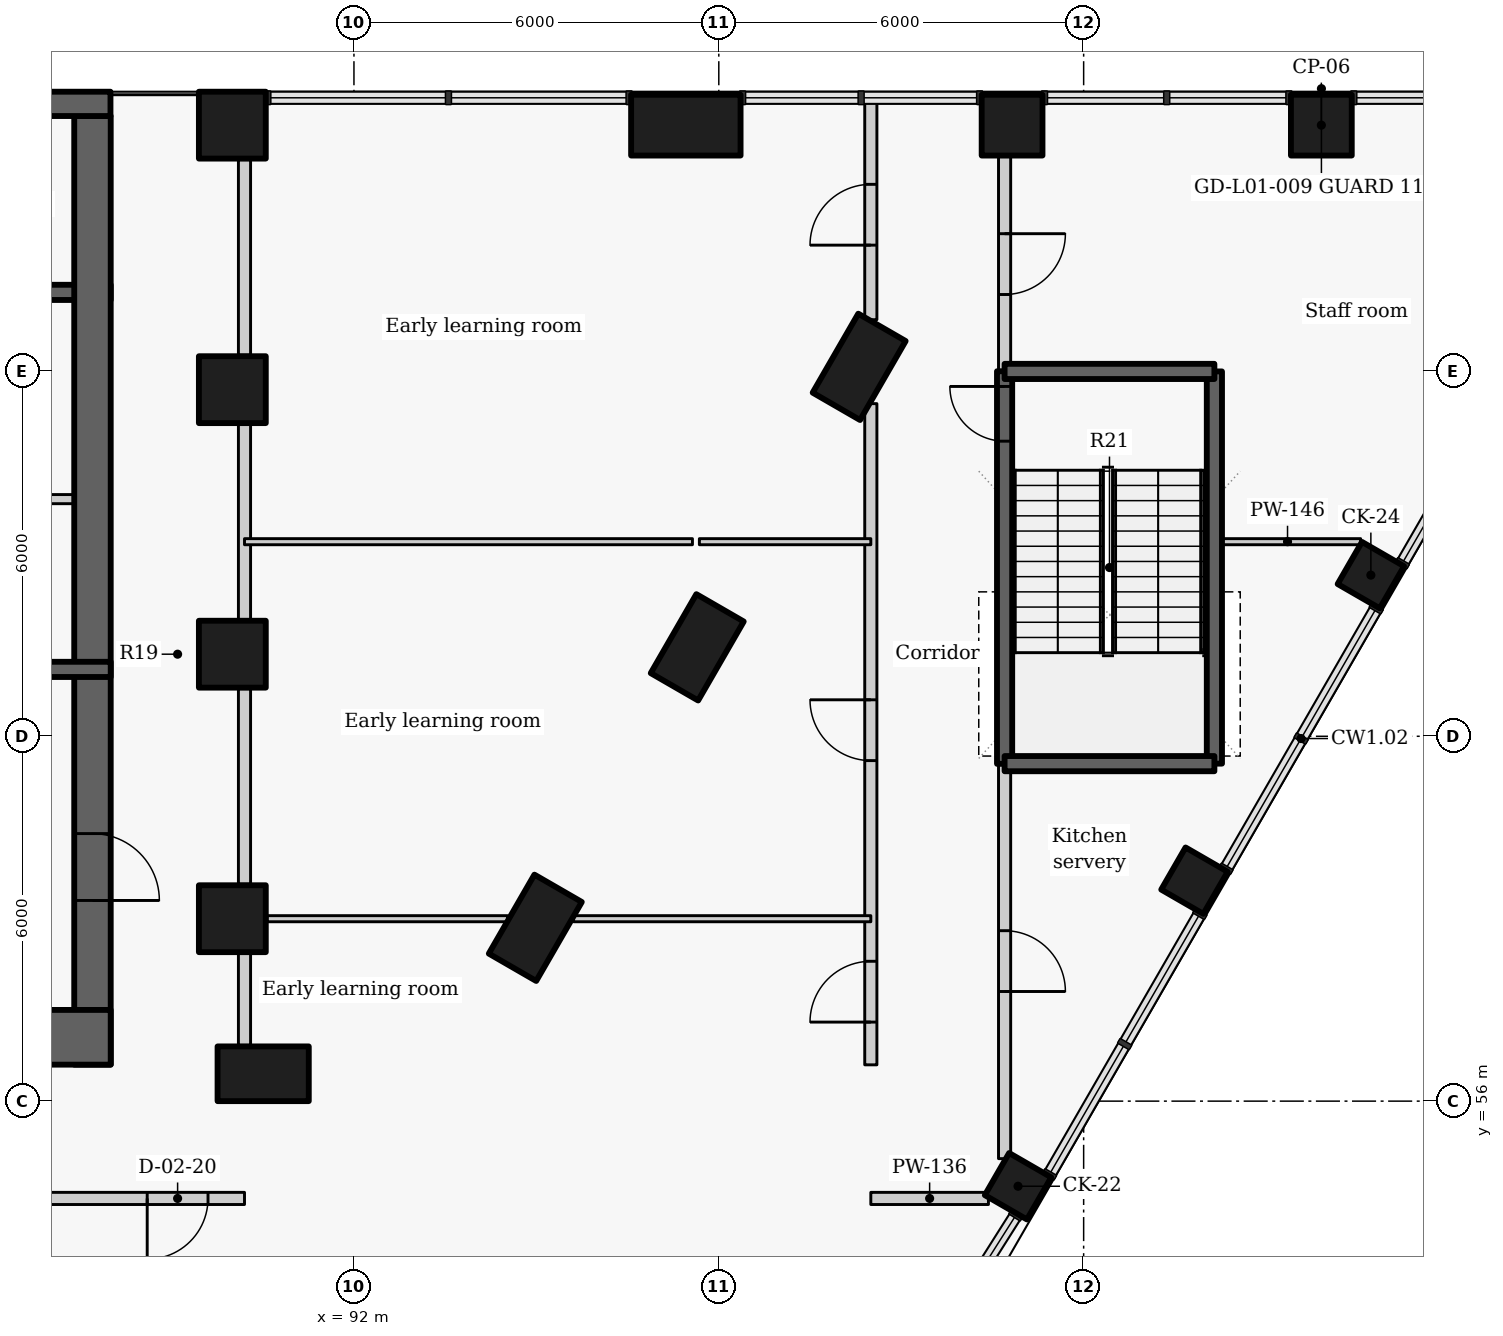
"""IFC4 building model, lengths in metres.
Left out: names, types, materials, properties, quantities, classifications, styles, units other than length and angle.
Written with IfcOpenShell. Run it as: python <this file> out.ifc"""

import sys

from ifc_helpers import new_model, si_unit, direction, frame, frame_2d, origin, origin_2d, place, context, subcontext, project, spatial, rectangle, extrude, element, fill, save


model = new_model("IFC4")
c1 = context("Model", 3, precision=1e-05, world=origin(), true_north=direction((0.0, 1.0)))
c2 = subcontext(c1, "Body", "Model", "MODEL_VIEW")
j1 = project(units=[si_unit("LENGTHUNIT", "METRE"), si_unit("PLANEANGLEUNIT", "RADIAN")], contexts=[c1])
p1 = place(None, origin())
s1 = spatial("IfcSite", under=j1, at=p1, CompositionType="ELEMENT")
p2 = place(p1, origin())
s2 = spatial("IfcBuilding", under=s1, at=p2, CompositionType="ELEMENT")
p3 = place(p2, frame((0.0, 0.0, 6.6)))
s3 = spatial("IfcBuildingStorey", under=s2, at=p3, CompositionType="ELEMENT", Elevation=6.6)
for number, where, z_axis, x_axis in (
    (1, (90.507, 56.45, 0.0), (0.0, 0.0, 1.0), (1.0, 0.0, 0.0)),
    (2, (94.982, 58.851, 0.0), (0.0, 0.0, 1.0), (0.5, 0.866, 0.0)),
    (3, (97.646, 63.463, 0.0), (0.0, 0.0, 1.0), (0.5, 0.866, 0.0)),
    (4, (100.308, 68.075, 0.0), (0.0, 0.0, 1.0), (0.5, 0.866, 0.0)),
):
    element("IfcColumn", number, at=place(p3, frame(where, z_axis=z_axis, x_axis=x_axis)), inside=s3, PredefinedType="COLUMN", context=c2, shape_type="SweptSolid", body=[
        extrude(rectangle(XDim=1.5, YDim=0.9, at=origin_2d()), origin(), (0.0, 0.0, 1.0), 4.8),
    ])
for number, where, z_axis, x_axis in (
    (5, (90.0, 59.0, 0.0), (0.0, 0.0, 1.0), (0.0, 1.0, 0.0)),
    (6, (90.0, 63.35, 0.0), (0.0, 0.0, 1.0), (0.0, 1.0, 0.0)),
    (7, (90.0, 67.7, 0.0), (0.0, 0.0, 1.0), (0.0, 1.0, 0.0)),
    (8, (90.0, 72.05, 0.0), (0.0, 0.0, 1.0), (0.0, 1.0, 0.0)),
):
    element("IfcColumn", number, at=place(p3, frame(where, z_axis=z_axis, x_axis=x_axis)), inside=s3, PredefinedType="COLUMN", context=c2, shape_type="SweptSolid", body=[
        extrude(rectangle(XDim=1.1, YDim=1.1, at=origin_2d()), origin(), (0.0, 0.0, 1.0), 4.8),
    ])
for number, where, z_axis, x_axis in (
    (9, (102.921, 54.6, 0.0), (0.0, 0.0, 1.0), (0.5, 0.866, 0.0)),
    (10, (105.822, 59.625, 0.0), (0.0, 0.0, 1.0), (0.5, 0.866, 0.0)),
    (11, (108.723, 64.65, 0.0), (0.0, 0.0, 1.0), (0.5, 0.866, 0.0)),
):
    element("IfcColumn", number, at=place(p3, frame(where, z_axis=z_axis, x_axis=x_axis)), inside=s3, PredefinedType="COLUMN", context=c2, shape_type="SweptSolid", body=[
        extrude(rectangle(XDim=0.8, YDim=0.8, at=origin_2d()), origin(), (0.0, 0.0, 1.0), 4.8),
    ])
p4 = place(p3, frame((97.458, 72.05, 0.0), z_axis=(0.0, 0.0, 1.0), x_axis=(1.0, 0.0, 0.0)))
e12 = element("IfcColumn", 12, at=p4, inside=s3, PredefinedType="COLUMN", context=c2, shape_type="SweptSolid", body=[
    extrude(rectangle(XDim=1.8, YDim=1.0, at=origin_2d()), origin(), (0.0, 0.0, 1.0), 4.8),
])
for number, where, z_axis, x_axis in (
    (13, (102.823, 72.05, 0.0), (0.0, 0.0, 1.0), (1.0, 0.0, 0.0)),
    (14, (107.909, 72.05, 0.0), (0.0, 0.0, 1.0), (1.0, 0.0, 0.0)),
):
    element("IfcColumn", number, at=place(p3, frame(where, z_axis=z_axis, x_axis=x_axis)), inside=s3, PredefinedType="COLUMN", context=c2, shape_type="SweptSolid", body=[
        extrude(rectangle(XDim=1.0, YDim=1.0, at=origin_2d()), origin(), (0.0, 0.0, 1.0), 4.8),
    ])
p5 = place(p3, frame((85.4, 69.3, -0.3), z_axis=(0.0, 0.0, 1.0), x_axis=(1.0, 0.0, 0.0)))
e15 = element("IfcWall", 15, at=p5, inside=s3, PredefinedType="SHEAR", context=c2, shape_type="SweptSolid", body=[
    extrude(rectangle(XDim=2.6, YDim=0.25, at=frame_2d((1.3, 0.0))), origin(), (0.0, 0.0, 1.0), 4.8),
])
p6 = place(p5, frame((0.525, 0.0, 0.3)))
e16 = element("IfcOpeningElement", 16, at=p6, cuts=e15, PredefinedType="OPENING", context=c2, shape_type="SweptSolid", body=[
    extrude(rectangle(XDim=0.9, YDim=2.1, at=frame_2d((0.45, 1.05))), frame((0.0, 0.135, 0.0), z_axis=(0.0, -1.0, 0.0), x_axis=(1.0, 0.0, 0.0)), (0.0, 0.0, 1.0), 0.27),
])
p7 = place(p3, frame((87.7, 72.2, -0.3), z_axis=(0.0, 0.0, 1.0), x_axis=(0.0, -1.0, 0.0)))
e17 = element("IfcWall", 17, at=p7, inside=s3, PredefinedType="SHEAR", context=c2, shape_type="SweptSolid", body=[
    extrude(rectangle(XDim=15.6, YDim=0.6, at=frame_2d((7.8, 0.0))), origin(), (0.0, 0.0, 1.0), 4.8),
])
p8 = place(p7, frame((11.8, 0.0, 0.3)))
e18 = element("IfcOpeningElement", 18, at=p8, cuts=e17, PredefinedType="OPENING", context=c2, shape_type="SweptSolid", body=[
    extrude(rectangle(XDim=1.1, YDim=2.1, at=frame_2d((0.55, 1.05))), frame((0.0, 0.31, 0.0), z_axis=(0.0, -1.0, 0.0), x_axis=(1.0, 0.0, 0.0)), (0.0, 0.0, 1.0), 0.62),
])
p9 = place(p3, frame((88.0, 65.9, 0.0), z_axis=(0.0, 0.0, 1.0), x_axis=(-1.0, 0.0, 0.0)))
e19 = element("IfcWall", 19, at=p9, inside=s3, PredefinedType="PARTITIONING", context=c2, shape_type="SweptSolid", body=[
    extrude(rectangle(XDim=2.603, YDim=0.15, at=frame_2d((1.302, 0.0))), origin(), (0.0, 0.0, 1.0), 4.5),
])
p10 = place(p9, frame((1.175, 0.0, 0.0)))
e20 = element("IfcOpeningElement", 20, at=p10, cuts=e19, PredefinedType="OPENING", context=c2, shape_type="SweptSolid", body=[
    extrude(rectangle(XDim=0.9, YDim=2.1, at=frame_2d((0.45, 1.05))), frame((0.0, 0.085, 0.0), z_axis=(0.0, -1.0, 0.0), x_axis=(1.0, 0.0, 0.0)), (0.0, 0.0, 1.0), 0.17),
])
p11 = place(p3, frame((80.0, 63.1, -0.3), z_axis=(0.0, 0.0, 1.0), x_axis=(1.0, 0.0, 0.0)))
e21 = element("IfcWall", 21, at=p11, inside=s3, PredefinedType="SHEAR", context=c2, shape_type="SweptSolid", body=[
    extrude(rectangle(XDim=8.0, YDim=0.25, at=frame_2d((4.0, 0.0))), origin(), (0.0, 0.0, 1.0), 4.8),
])
p12 = place(p11, frame((3.849, 0.0, 0.3)))
e22 = element("IfcOpeningElement", 22, at=p12, cuts=e21, PredefinedType="OPENING", context=c2, shape_type="SweptSolid", body=[
    extrude(rectangle(XDim=1.1, YDim=2.1, at=frame_2d((0.55, 1.05))), frame((0.0, 0.135, 0.0), z_axis=(0.0, -1.0, 0.0), x_axis=(1.0, 0.0, 0.0)), (0.0, 0.0, 1.0), 0.27),
])
p13 = place(p3, frame((88.0, 57.05, -0.3), z_axis=(0.0, 0.0, 1.0), x_axis=(-1.0, 0.0, 0.0)))
e23 = element("IfcWall", 23, at=p13, inside=s3, PredefinedType="SHEAR", context=c2, shape_type="SweptSolid", body=[
    extrude(rectangle(XDim=4.6, YDim=0.9, at=frame_2d((2.3, 0.0))), origin(), (0.0, 0.0, 1.0), 4.8),
])
p14 = place(p13, frame((1.752, 0.0, 0.3)))
e24 = element("IfcOpeningElement", 24, at=p14, cuts=e23, PredefinedType="OPENING", context=c2, shape_type="SweptSolid", body=[
    extrude(rectangle(XDim=1.1, YDim=2.1, at=frame_2d((0.55, 1.05))), frame((0.0, 0.46, 0.0), z_axis=(0.0, -1.0, 0.0), x_axis=(1.0, 0.0, 0.0)), (0.0, 0.0, 1.0), 0.92),
])
p15 = place(p3, frame((102.7, 61.547, -0.3), z_axis=(0.0, 0.0, 1.0), x_axis=(0.0, 1.0, 0.0)))
e25 = element("IfcWall", 25, at=p15, inside=s3, PredefinedType="SHEAR", context=c2, shape_type="SweptSolid", body=[
    extrude(rectangle(XDim=6.456, YDim=0.25, at=frame_2d((3.228, 0.0))), origin(), (0.0, 0.0, 1.0), 4.8),
])
p16 = place(p15, frame((5.306, 0.0, 0.3)))
e26 = element("IfcOpeningElement", 26, at=p16, cuts=e25, PredefinedType="OPENING", context=c2, shape_type="SweptSolid", body=[
    extrude(rectangle(XDim=0.9, YDim=2.1, at=frame_2d((0.45, 1.05))), frame((0.0, 0.135, 0.0), z_axis=(0.0, -1.0, 0.0), x_axis=(1.0, 0.0, 0.0)), (0.0, 0.0, 1.0), 0.27),
])
p17 = place(p3, frame((102.7, 61.553, 0.0), z_axis=(0.0, 0.0, 1.0), x_axis=(0.0, -1.0, 0.0)))
e27 = element("IfcWall", 27, at=p17, inside=s3, PredefinedType="PARTITIONING", context=c2, shape_type="SweptSolid", body=[
    extrude(rectangle(XDim=6.499, YDim=0.2, at=frame_2d((3.249, 0.0))), origin(), (0.0, 0.0, 1.0), 4.5),
])
p18 = place(p17, frame((2.75, 0.0, 0.0)))
e28 = element("IfcOpeningElement", 28, at=p18, cuts=e27, PredefinedType="OPENING", context=c2, shape_type="SweptSolid", body=[
    extrude(rectangle(XDim=1.0, YDim=2.1, at=frame_2d((0.5, 1.05))), frame((0.0, 0.11, 0.0), z_axis=(0.0, -1.0, 0.0), x_axis=(1.0, 0.0, 0.0)), (0.0, 0.0, 1.0), 0.22),
])
p19 = place(p3, frame((102.7, 71.533, 0.0), z_axis=(0.0, 0.0, 1.0), x_axis=(0.0, -1.0, 0.0)))
e29 = element("IfcWall", 29, at=p19, inside=s3, PredefinedType="PARTITIONING", context=c2, shape_type="SweptSolid", body=[
    extrude(rectangle(XDim=3.536, YDim=0.2, at=frame_2d((1.768, 0.0))), origin(), (0.0, 0.0, 1.0), 4.5),
])
p20 = place(p19, frame((1.268, 0.0, 0.0)))
e30 = element("IfcOpeningElement", 30, at=p20, cuts=e29, PredefinedType="OPENING", context=c2, shape_type="SweptSolid", body=[
    extrude(rectangle(XDim=1.0, YDim=2.1, at=frame_2d((0.5, 1.05))), frame((0.0, 0.11, 0.0), z_axis=(0.0, -1.0, 0.0), x_axis=(1.0, 0.0, 0.0)), (0.0, 0.0, 1.0), 0.22),
])
p21 = place(p3, frame((100.5, 56.597, 0.0), z_axis=(0.0, 0.0, 1.0), x_axis=(0.0, 1.0, 0.0)))
e31 = element("IfcWall", 31, at=p21, inside=s3, PredefinedType="PARTITIONING", context=c2, shape_type="SweptSolid", body=[
    extrude(rectangle(XDim=10.873, YDim=0.2, at=frame_2d((5.437, 0.0))), origin(), (0.0, 0.0, 1.0), 4.5),
])
p22 = place(p21, frame((5.003, 0.0, 0.0)))
e32 = element("IfcOpeningElement", 32, at=p22, cuts=e31, PredefinedType="OPENING", context=c2, shape_type="SweptSolid", body=[
    extrude(rectangle(XDim=1.0, YDim=2.1, at=frame_2d((0.5, 1.05))), frame((0.0, 0.11, 0.0), z_axis=(0.0, -1.0, 0.0), x_axis=(1.0, 0.0, 0.0)), (0.0, 0.0, 1.0), 0.22),
])
p23 = place(p21, frame((0.703, 0.0, 0.0)))
e33 = element("IfcOpeningElement", 33, at=p23, cuts=e31, PredefinedType="OPENING", context=c2, shape_type="SweptSolid", body=[
    extrude(rectangle(XDim=1.0, YDim=2.1, at=frame_2d((0.5, 1.05))), frame((0.0, 0.11, 0.0), z_axis=(0.0, -1.0, 0.0), x_axis=(1.0, 0.0, 0.0)), (0.0, 0.0, 1.0), 0.22),
])
p24 = place(p3, frame((100.5, 68.851, 0.0), z_axis=(0.0, 0.0, 1.0), x_axis=(0.0, 1.0, 0.0)))
e34 = element("IfcWall", 34, at=p24, inside=s3, PredefinedType="PARTITIONING", context=c2, shape_type="SweptSolid", body=[
    extrude(rectangle(XDim=3.569, YDim=0.2, at=frame_2d((1.785, 0.0))), origin(), (0.0, 0.0, 1.0), 3.73),
])
p25 = place(p24, frame((1.226, 0.0, 0.0)))
e35 = element("IfcOpeningElement", 35, at=p25, cuts=e34, PredefinedType="OPENING", context=c2, shape_type="SweptSolid", body=[
    extrude(rectangle(XDim=1.0, YDim=2.1, at=frame_2d((0.5, 1.05))), frame((0.0, 0.11, 0.0), z_axis=(0.0, -1.0, 0.0), x_axis=(1.0, 0.0, 0.0)), (0.0, 0.0, 1.0), 0.22),
])
p26 = place(p3, frame((90.2, 56.917, 0.0), z_axis=(0.0, 0.0, 1.0), x_axis=(0.0, 1.0, 0.0)))
e36 = element("IfcWall", 36, at=p26, inside=s3, PredefinedType="PARTITIONING", context=c2, shape_type="SweptSolid", body=[
    extrude(rectangle(XDim=1.516, YDim=0.2, at=frame_2d((0.758, 0.0))), origin(), (0.0, 0.0, 1.0), 4.5),
])
for number, where, z_axis, x_axis in (
    (37, (90.2, 59.567, 0.0), (0.0, 0.0, 1.0), (0.0, 1.0, 0.0)),
    (38, (90.2, 63.917, 0.0), (0.0, 0.0, 1.0), (0.0, 1.0, 0.0)),
):
    element("IfcWall", number, at=place(p3, frame(where, z_axis=z_axis, x_axis=x_axis)), inside=s3, PredefinedType="PARTITIONING", context=c2, shape_type="SweptSolid", body=[
        extrude(rectangle(XDim=3.216, YDim=0.2, at=frame_2d((1.608, 0.0))), origin(), (0.0, 0.0, 1.0), 3.73),
    ])
p27 = place(p3, frame((90.2, 68.267, 0.0), z_axis=(0.0, 0.0, 1.0), x_axis=(0.0, 1.0, 0.0)))
e39 = element("IfcWall", 39, at=p27, inside=s3, PredefinedType="PARTITIONING", context=c2, shape_type="SweptSolid", body=[
    extrude(rectangle(XDim=3.216, YDim=0.2, at=frame_2d((1.608, 0.0))), origin(), (0.0, 0.0, 1.0), 3.73),
])
p28 = place(p3, frame((106.15, 61.55, -0.3), z_axis=(0.0, 0.0, 1.0), x_axis=(0.0, 1.0, 0.0)))
e40 = element("IfcWall", 40, at=p28, inside=s3, PredefinedType="SHEAR", context=c2, shape_type="SweptSolid", body=[
    extrude(rectangle(XDim=6.45, YDim=0.25, at=frame_2d((3.225, 0.0))), origin(), (0.0, 0.0, 1.0), 4.8),
])
p29 = place(p3, frame((90.2, 54.4, 0.0), z_axis=(0.0, 0.0, 1.0), x_axis=(-1.0, 0.0, 0.0)))
e41 = element("IfcWall", 41, at=p29, inside=s3, PredefinedType="PARTITIONING", context=c2, shape_type="SweptSolid", body=[
    extrude(rectangle(XDim=20.4, YDim=0.2, at=frame_2d((10.2, 0.0))), origin(), (0.0, 0.0, 1.0), 4.5),
])
p30 = place(p29, frame((18.8, 0.0, 0.0)))
e42 = element("IfcOpeningElement", 42, at=p30, cuts=e41, PredefinedType="OPENING", context=c2, shape_type="SweptSolid", body=[
    extrude(rectangle(XDim=1.0, YDim=2.1, at=frame_2d((0.5, 1.05))), frame((0.0, 0.11, 0.0), z_axis=(0.0, -1.0, 0.0), x_axis=(1.0, 0.0, 0.0)), (0.0, 0.0, 1.0), 0.22),
])
p31 = place(p29, frame((0.6, 0.0, 0.0)))
e43 = element("IfcOpeningElement", 43, at=p31, cuts=e41, PredefinedType="OPENING", context=c2, shape_type="SweptSolid", body=[
    extrude(rectangle(XDim=1.0, YDim=2.1, at=frame_2d((0.5, 1.05))), frame((0.0, 0.11, 0.0), z_axis=(0.0, -1.0, 0.0), x_axis=(1.0, 0.0, 0.0)), (0.0, 0.0, 1.0), 0.22),
])
p32 = place(p29, frame((10.1, 0.0, 0.0)))
e44 = element("IfcOpeningElement", 44, at=p32, cuts=e41, PredefinedType="OPENING", context=c2, shape_type="SweptSolid", body=[
    extrude(rectangle(XDim=1.0, YDim=2.1, at=frame_2d((0.5, 1.05))), frame((0.0, 0.11, 0.0), z_axis=(0.0, -1.0, 0.0), x_axis=(1.0, 0.0, 0.0)), (0.0, 0.0, 1.0), 0.22),
])
p33 = place(p3, frame((100.5, 54.4, 0.0), z_axis=(0.0, 0.0, 1.0), x_axis=(1.0, 0.0, 0.0)))
e45 = element("IfcWall", 45, at=p33, inside=s3, PredefinedType="PARTITIONING", context=c2, shape_type="SweptSolid", body=[
    extrude(rectangle(XDim=1.934, YDim=0.2, at=frame_2d((0.967, 0.0))), origin(), (0.0, 0.0, 1.0), 4.5),
])
for number, where, z_axis, x_axis in (
    (46, (102.7, 68.0, -0.3), (0.0, 0.0, 1.0), (1.0, 0.0, 0.0)),
    (47, (102.7, 61.55, -0.3), (0.0, 0.0, 1.0), (1.0, 0.0, 0.0)),
):
    element("IfcWall", number, at=place(p3, frame(where, z_axis=z_axis, x_axis=x_axis)), inside=s3, PredefinedType="SHEAR", context=c2, shape_type="SweptSolid", body=[
        extrude(rectangle(XDim=3.45, YDim=0.25, at=frame_2d((1.725, 0.0))), origin(), (0.0, 0.0, 1.0), 4.8),
    ])
p34 = place(p3, frame((90.2, 65.2, 0.0), z_axis=(0.0, 0.0, 1.0), x_axis=(1.0, 0.0, 0.0)))
e48 = element("IfcWall", 48, at=p34, inside=s3, PredefinedType="PARTITIONING", context=c2, shape_type="SweptSolid", body=[
    extrude(rectangle(XDim=7.366, YDim=0.1, at=frame_2d((3.683, 0.0))), origin(), (0.0, 0.0, 1.0), 4.5),
])
p35 = place(p3, frame((97.68, 65.2, 0.0), z_axis=(0.0, 0.0, 1.0), x_axis=(1.0, 0.0, 0.0)))
e49 = element("IfcWall", 49, at=p35, inside=s3, PredefinedType="PARTITIONING", context=c2, shape_type="SweptSolid", body=[
    extrude(rectangle(XDim=2.82, YDim=0.1, at=frame_2d((1.41, 0.0))), origin(), (0.0, 0.0, 1.0), 3.58),
])
p36 = place(p3, frame((106.15, 65.2, 0.0), z_axis=(0.0, 0.0, 1.0), x_axis=(1.0, 0.0, 0.0)))
e50 = element("IfcWall", 50, at=p36, inside=s3, PredefinedType="PARTITIONING", context=c2, shape_type="SweptSolid", body=[
    extrude(rectangle(XDim=2.406, YDim=0.1, at=frame_2d((1.203, 0.0))), origin(), (0.0, 0.0, 1.0), 4.5),
])
p37 = place(p3, frame((90.57, 59.0, 0.0), z_axis=(0.0, 0.0, 1.0), x_axis=(1.0, 0.0, 0.0)))
e51 = element("IfcWall", 51, at=p37, inside=s3, PredefinedType="PARTITIONING", context=c2, shape_type="SweptSolid", body=[
    extrude(rectangle(XDim=3.956, YDim=0.1, at=frame_2d((1.978, 0.0))), origin(), (0.0, 0.0, 1.0), 4.5),
])
p38 = place(p3, frame((95.612, 59.0, 0.0), z_axis=(0.0, 0.0, 1.0), x_axis=(1.0, 0.0, 0.0)))
e52 = element("IfcWall", 52, at=p38, inside=s3, PredefinedType="PARTITIONING", context=c2, shape_type="SweptSolid", body=[
    extrude(rectangle(XDim=4.888, YDim=0.1, at=frame_2d((2.444, 0.0))), origin(), (0.0, 0.0, 1.0), 4.5),
])
p39 = place(p3, frame((72.004, 72.4, -0.3), z_axis=(0.0, 0.0, 1.0), x_axis=(1.0, 0.0, 0.0)))
e53 = element("IfcWall", 53, at=p39, inside=s3, PredefinedType="SHEAR", context=c2, shape_type="SweptSolid", body=[
    extrude(rectangle(XDim=15.992, YDim=0.4, at=frame_2d((7.996, 0.0))), origin(), (0.0, 0.0, 1.0), 4.8),
])
p40 = place(p16, origin())
e54 = element("IfcDoor", 54, at=p40, inside=s3, OperationType="SINGLE_SWING_RIGHT", PredefinedType="DOOR", context=c2, shape_type="SweptSolid", body=[
    extrude(rectangle(XDim=0.9, YDim=2.1, at=frame_2d((0.45, 1.05))), frame((0.0, 0.025, 0.0), z_axis=(0.0, -1.0, 0.0), x_axis=(1.0, 0.0, 0.0)), (0.0, 0.0, 1.0), 0.05),
])
fill(e26, e54)
p41 = place(p20, origin())
e55 = element("IfcDoor", 55, at=p41, inside=s3, OperationType="SINGLE_SWING_LEFT", PredefinedType="DOOR", context=c2, shape_type="SweptSolid", body=[
    extrude(rectangle(XDim=1.0, YDim=2.1, at=frame_2d((0.5, 1.05))), frame((0.0, 0.025, 0.0), z_axis=(0.0, -1.0, 0.0), x_axis=(1.0, 0.0, 0.0)), (0.0, 0.0, 1.0), 0.05),
])
fill(e30, e55)
p42 = place(p18, origin())
e56 = element("IfcDoor", 56, at=p42, inside=s3, OperationType="SINGLE_SWING_RIGHT", PredefinedType="DOOR", context=c2, shape_type="SweptSolid", body=[
    extrude(rectangle(XDim=1.0, YDim=2.1, at=frame_2d((0.5, 1.05))), frame((0.0, 0.025, 0.0), z_axis=(0.0, -1.0, 0.0), x_axis=(1.0, 0.0, 0.0)), (0.0, 0.0, 1.0), 0.05),
])
fill(e28, e56)
p43 = place(p25, origin())
e57 = element("IfcDoor", 57, at=p43, inside=s3, OperationType="SINGLE_SWING_LEFT", PredefinedType="DOOR", context=c2, shape_type="SweptSolid", body=[
    extrude(rectangle(XDim=1.0, YDim=2.1, at=frame_2d((0.5, 1.05))), frame((0.0, 0.025, 0.0), z_axis=(0.0, -1.0, 0.0), x_axis=(1.0, 0.0, 0.0)), (0.0, 0.0, 1.0), 0.05),
])
fill(e35, e57)
p44 = place(p22, origin())
e58 = element("IfcDoor", 58, at=p44, inside=s3, OperationType="SINGLE_SWING_RIGHT", PredefinedType="DOOR", context=c2, shape_type="SweptSolid", body=[
    extrude(rectangle(XDim=1.0, YDim=2.1, at=frame_2d((0.5, 1.05))), frame((0.0, 0.025, 0.0), z_axis=(0.0, -1.0, 0.0), x_axis=(1.0, 0.0, 0.0)), (0.0, 0.0, 1.0), 0.05),
])
fill(e32, e58)
p45 = place(p23, origin())
e59 = element("IfcDoor", 59, at=p45, inside=s3, OperationType="SINGLE_SWING_LEFT", PredefinedType="DOOR", context=c2, shape_type="SweptSolid", body=[
    extrude(rectangle(XDim=1.0, YDim=2.1, at=frame_2d((0.5, 1.05))), frame((0.0, 0.025, 0.0), z_axis=(0.0, -1.0, 0.0), x_axis=(1.0, 0.0, 0.0)), (0.0, 0.0, 1.0), 0.05),
])
fill(e33, e59)
p46 = place(p31, origin())
e60 = element("IfcDoor", 60, at=p46, inside=s3, OperationType="SINGLE_SWING_RIGHT", PredefinedType="DOOR", context=c2, shape_type="SweptSolid", body=[
    extrude(rectangle(XDim=1.0, YDim=2.1, at=frame_2d((0.5, 1.05))), frame((0.0, 0.025, 0.0), z_axis=(0.0, -1.0, 0.0), x_axis=(1.0, 0.0, 0.0)), (0.0, 0.0, 1.0), 0.05),
])
fill(e43, e60)
p47 = place(p8, origin())
e61 = element("IfcDoor", 61, at=p47, inside=s3, OperationType="SINGLE_SWING_RIGHT", PredefinedType="DOOR", context=c2, shape_type="SweptSolid", body=[
    extrude(rectangle(XDim=1.1, YDim=2.1, at=frame_2d((0.55, 1.05))), frame((0.0, 0.025, 0.0), z_axis=(0.0, -1.0, 0.0), x_axis=(1.0, 0.0, 0.0)), (0.0, 0.0, 1.0), 0.05),
])
fill(e18, e61)
save(model, sys.argv[1])
